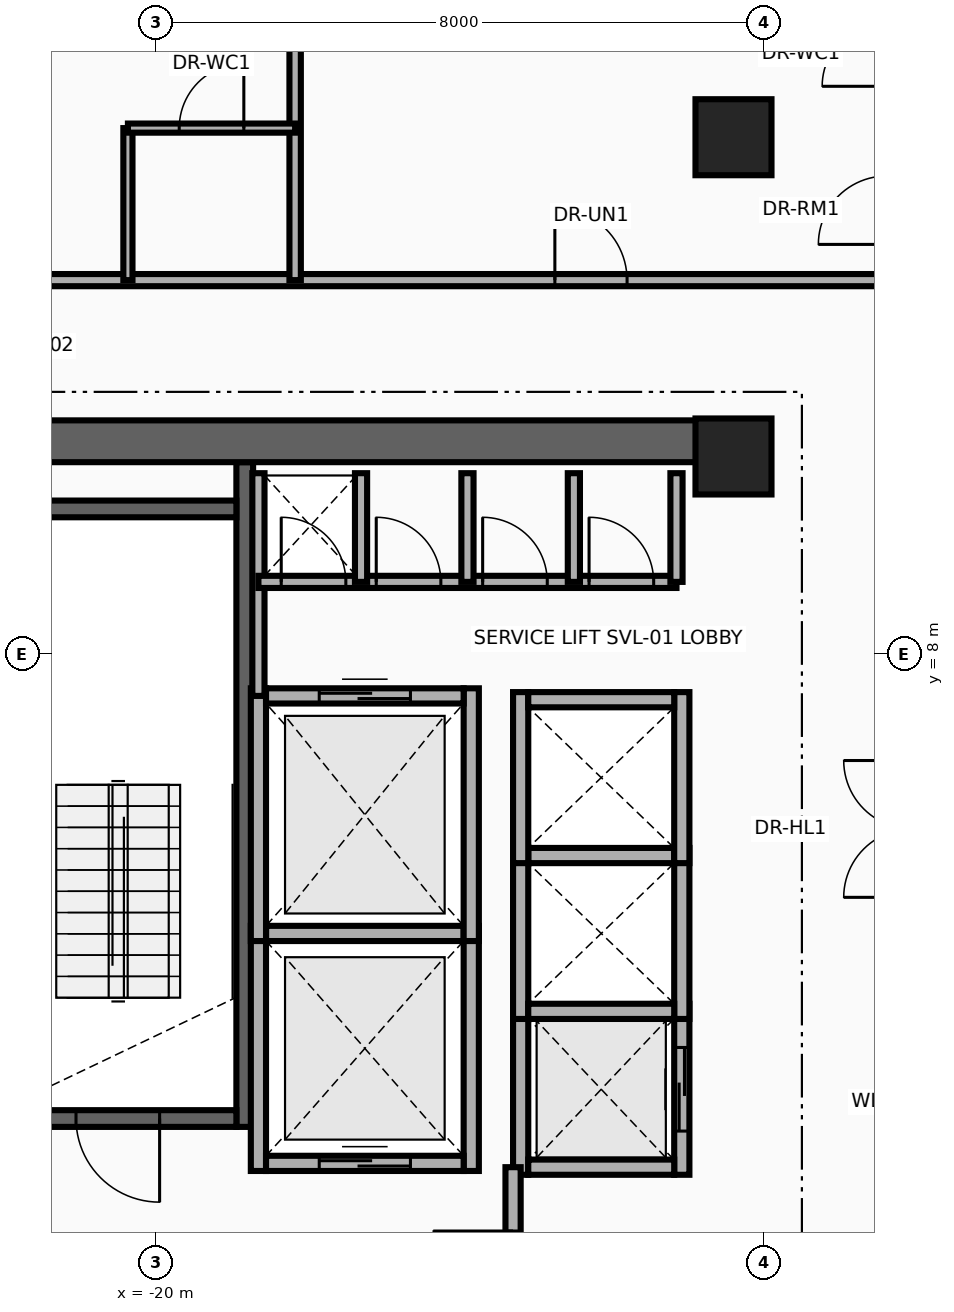
"""IFC4 building model, lengths in metres.
Left out: names, types, materials, properties, quantities, classifications, styles, units other than length and angle.
Written with IfcOpenShell. Run it as: python <this file> out.ifc"""

import sys

from ifc_helpers import new_model, si_unit, direction, frame, frame_2d, origin, origin_2d, place, context, subcontext, project, spatial, rectangle, extrude, source, transform, mapped, element, fill, save


model = new_model("IFC4")
c1 = context("Model", 3, precision=1e-05, world=origin(), true_north=direction((0.0, 1.0)))
c2 = subcontext(c1, "Body", "Model", "MODEL_VIEW")
j1 = project(units=[si_unit("LENGTHUNIT", "METRE"), si_unit("PLANEANGLEUNIT", "RADIAN")], contexts=[c1])
p1 = place(None, origin())
s1 = spatial("IfcSite", under=j1, at=p1, CompositionType="ELEMENT")
p2 = place(p1, origin())
s2 = spatial("IfcBuilding", under=s1, at=p2, CompositionType="ELEMENT")
p3 = place(p2, frame((0.0, 0.0, 184.45)))
s3 = spatial("IfcBuildingStorey", under=s2, at=p3, CompositionType="ELEMENT", Elevation=184.45)
p4 = place(p3, frame((-18.83, 1.78, 0.0), z_axis=(0.0, 0.0, 1.0), x_axis=(0.0, 1.0, 0.0)))
e1 = element("IfcWall", 1, at=p4, inside=s3, PredefinedType="SHEAR", context=c2, shape_type="SweptSolid", body=[
    extrude(rectangle(XDim=8.745, YDim=0.22, at=frame_2d((4.373, 0.0))), origin(), (0.0, 0.0, 1.0), 3.63),
])
p5 = place(p3, frame((-22.05, 1.89, 0.0), z_axis=(0.0, 0.0, 1.0), x_axis=(1.0, 0.0, 0.0)))
e2 = element("IfcWall", 2, at=p5, inside=s3, PredefinedType="SHEAR", context=c2, shape_type="SweptSolid", body=[
    extrude(rectangle(XDim=3.11, YDim=0.22, at=frame_2d((1.555, 0.0))), origin(), (0.0, 0.0, 1.0), 3.63),
])
p6 = place(p5, frame((1.0, 0.0, 0.0)))
e3 = element("IfcOpeningElement", 3, at=p6, cuts=e2, PredefinedType="OPENING", context=c2, shape_type="SweptSolid", body=[
    extrude(rectangle(XDim=1.1, YDim=2.15, at=frame_2d((0.55, 1.075))), frame((0.0, 0.125, 0.0), z_axis=(0.0, -1.0, 0.0), x_axis=(1.0, 0.0, 0.0)), (0.0, 0.0, 1.0), 0.25),
])
p7 = place(p3, frame((-22.05, 9.91, 0.0), z_axis=(0.0, 0.0, 1.0), x_axis=(1.0, 0.0, 0.0)))
e4 = element("IfcWall", 4, at=p7, inside=s3, PredefinedType="SHEAR", context=c2, shape_type="SweptSolid", body=[
    extrude(rectangle(XDim=3.11, YDim=0.22, at=frame_2d((1.555, 0.0))), origin(), (0.0, 0.0, 1.0), 3.63),
])
p8 = place(p3, frame((-22.65, 10.8, 0.0), z_axis=(0.0, 0.0, 1.0), x_axis=(1.0, 0.0, 0.0)))
e5 = element("IfcWall", 5, at=p8, inside=s3, PredefinedType="SHEAR", context=c2, shape_type="SweptSolid", body=[
    extrude(rectangle(XDim=10.25, YDim=0.55, at=frame_2d((5.125, 0.0))), origin(), (0.0, 0.0, 1.0), 3.63),
])
m1 = source(origin(), c2, "Body", "SweptSolid", [
    extrude(rectangle(XDim=1.0, YDim=1.0, at=origin_2d()), origin(), (0.0, 0.0, 1.0), 3.95),
])
for number, where, z_axis, x_axis in (
    (6, (-12.4, 10.6, 0.0), (0.0, 0.0, 1.0), (1.0, 0.0, 0.0)),
    (7, (-12.4, 14.8, 0.0), (0.0, 0.0, 1.0), (1.0, 0.0, 0.0)),
):
    element("IfcColumn", number, at=place(p3, frame(where, z_axis=z_axis, x_axis=x_axis)), inside=s3, PredefinedType="COLUMN", context=c2, shape_type="MappedRepresentation", body=[
        mapped(m1, transform((0.0, 0.0, 0.0), x_axis=(1.0, 0.0, 0.0), y_axis=(0.0, 1.0, 0.0), z_axis=(0.0, 0.0, 1.0), scale=1.0)),
    ])
for number, where, z_axis, x_axis in (
    (8, (-18.65, 1.2, 0.0), (0.0, 0.0, 1.0), (0.0, 1.0, 0.0)),
    (9, (-15.85, 1.2, 0.0), (0.0, 0.0, 1.0), (0.0, 1.0, 0.0)),
):
    element("IfcWall", number, at=place(p3, frame(where, z_axis=z_axis, x_axis=x_axis)), inside=s3, PredefinedType="MOVABLE", context=c2, shape_type="SweptSolid", body=[
        extrude(rectangle(XDim=3.225, YDim=0.2, at=frame_2d((1.613, 0.0))), origin(), (0.0, 0.0, 1.0), 3.63),
    ])
p9 = place(p3, frame((-18.55, 1.3, 0.0), z_axis=(0.0, 0.0, 1.0), x_axis=(1.0, 0.0, 0.0)))
e10 = element("IfcWall", 10, at=p9, inside=s3, PredefinedType="MOVABLE", context=c2, shape_type="SweptSolid", body=[
    extrude(rectangle(XDim=2.6, YDim=0.2, at=frame_2d((1.3, 0.0))), origin(), (0.0, 0.0, 1.0), 3.63),
])
p10 = place(p9, frame((0.7, 0.0, 0.0)))
e11 = element("IfcOpeningElement", 11, at=p10, cuts=e10, PredefinedType="OPENING", context=c2, shape_type="SweptSolid", body=[
    extrude(rectangle(XDim=1.2, YDim=2.1, at=frame_2d((0.6, 1.05))), frame((0.0, 0.115, 0.0), z_axis=(0.0, -1.0, 0.0), x_axis=(1.0, 0.0, 0.0)), (0.0, 0.0, 1.0), 0.23),
])
p11 = place(p3, frame((-18.55, 4.325, 0.0), z_axis=(0.0, 0.0, 1.0), x_axis=(1.0, 0.0, 0.0)))
e12 = element("IfcWall", 12, at=p11, inside=s3, PredefinedType="MOVABLE", context=c2, shape_type="SweptSolid", body=[
    extrude(rectangle(XDim=2.6, YDim=0.2, at=frame_2d((1.3, 0.0))), origin(), (0.0, 0.0, 1.0), 3.63),
])
for number, where, z_axis, x_axis in (
    (13, (-18.65, 4.225, 0.0), (0.0, 0.0, 1.0), (0.0, 1.0, 0.0)),
    (14, (-15.85, 4.225, 0.0), (0.0, 0.0, 1.0), (0.0, 1.0, 0.0)),
):
    element("IfcWall", number, at=place(p3, frame(where, z_axis=z_axis, x_axis=x_axis)), inside=s3, PredefinedType="MOVABLE", context=c2, shape_type="SweptSolid", body=[
        extrude(rectangle(XDim=3.325, YDim=0.2, at=frame_2d((1.663, 0.0))), origin(), (0.0, 0.0, 1.0), 3.63),
    ])
p12 = place(p3, frame((-18.55, 7.45, 0.0), z_axis=(0.0, 0.0, 1.0), x_axis=(1.0, 0.0, 0.0)))
e15 = element("IfcWall", 15, at=p12, inside=s3, PredefinedType="MOVABLE", context=c2, shape_type="SweptSolid", body=[
    extrude(rectangle(XDim=2.6, YDim=0.2, at=frame_2d((1.3, 0.0))), origin(), (0.0, 0.0, 1.0), 3.63),
])
p13 = place(p12, frame((0.7, 0.0, 0.0)))
e16 = element("IfcOpeningElement", 16, at=p13, cuts=e15, PredefinedType="OPENING", context=c2, shape_type="SweptSolid", body=[
    extrude(rectangle(XDim=1.2, YDim=2.1, at=frame_2d((0.6, 1.05))), frame((0.0, 0.115, 0.0), z_axis=(0.0, -1.0, 0.0), x_axis=(1.0, 0.0, 0.0)), (0.0, 0.0, 1.0), 0.23),
])
p14 = place(p3, frame((-15.2, 1.15, 0.0), z_axis=(0.0, 0.0, 1.0), x_axis=(0.0, 1.0, 0.0)))
e17 = element("IfcWall", 17, at=p14, inside=s3, PredefinedType="MOVABLE", context=c2, shape_type="SweptSolid", body=[
    extrude(rectangle(XDim=2.25, YDim=0.2, at=frame_2d((1.125, 0.0))), origin(), (0.0, 0.0, 1.0), 3.63),
])
p15 = place(p3, frame((-13.08, 1.15, 0.0), z_axis=(0.0, 0.0, 1.0), x_axis=(0.0, 1.0, 0.0)))
e18 = element("IfcWall", 18, at=p15, inside=s3, PredefinedType="MOVABLE", context=c2, shape_type="SweptSolid", body=[
    extrude(rectangle(XDim=2.25, YDim=0.2, at=frame_2d((1.125, 0.0))), origin(), (0.0, 0.0, 1.0), 3.63),
])
p16 = place(p15, frame((0.575, 0.0, 0.0)))
e19 = element("IfcOpeningElement", 19, at=p16, cuts=e18, PredefinedType="OPENING", context=c2, shape_type="SweptSolid", body=[
    extrude(rectangle(XDim=1.1, YDim=2.1, at=frame_2d((0.55, 1.05))), frame((0.0, 0.115, 0.0), z_axis=(0.0, -1.0, 0.0), x_axis=(1.0, 0.0, 0.0)), (0.0, 0.0, 1.0), 0.23),
])
p17 = place(p3, frame((-15.1, 1.25, 0.0), z_axis=(0.0, 0.0, 1.0), x_axis=(1.0, 0.0, 0.0)))
e20 = element("IfcWall", 20, at=p17, inside=s3, PredefinedType="MOVABLE", context=c2, shape_type="SweptSolid", body=[
    extrude(rectangle(XDim=1.92, YDim=0.2, at=frame_2d((0.96, 0.0))), origin(), (0.0, 0.0, 1.0), 3.63),
])
for number, where, z_axis, x_axis in (
    (21, (-15.2, 3.2, 0.0), (0.0, 0.0, 1.0), (0.0, 1.0, 0.0)),
    (22, (-13.08, 3.2, 0.0), (0.0, 0.0, 1.0), (0.0, 1.0, 0.0)),
):
    element("IfcWall", number, at=place(p3, frame(where, z_axis=z_axis, x_axis=x_axis)), inside=s3, PredefinedType="MOVABLE", context=c2, shape_type="SweptSolid", body=[
        extrude(rectangle(XDim=2.25, YDim=0.2, at=frame_2d((1.125, 0.0))), origin(), (0.0, 0.0, 1.0), 3.63),
    ])
for number, where, z_axis, x_axis in (
    (23, (-15.1, 3.3, 0.0), (0.0, 0.0, 1.0), (1.0, 0.0, 0.0)),
    (24, (-15.1, 5.35, 0.0), (0.0, 0.0, 1.0), (1.0, 0.0, 0.0)),
):
    element("IfcWall", number, at=place(p3, frame(where, z_axis=z_axis, x_axis=x_axis)), inside=s3, PredefinedType="MOVABLE", context=c2, shape_type="SweptSolid", body=[
        extrude(rectangle(XDim=1.92, YDim=0.2, at=frame_2d((0.96, 0.0))), origin(), (0.0, 0.0, 1.0), 3.63),
    ])
for number, where, z_axis, x_axis in (
    (25, (-15.2, 5.25, 0.0), (0.0, 0.0, 1.0), (0.0, 1.0, 0.0)),
    (26, (-13.08, 5.25, 0.0), (0.0, 0.0, 1.0), (0.0, 1.0, 0.0)),
):
    element("IfcWall", number, at=place(p3, frame(where, z_axis=z_axis, x_axis=x_axis)), inside=s3, PredefinedType="MOVABLE", context=c2, shape_type="SweptSolid", body=[
        extrude(rectangle(XDim=2.25, YDim=0.2, at=frame_2d((1.125, 0.0))), origin(), (0.0, 0.0, 1.0), 3.63),
    ])
p18 = place(p3, frame((-15.1, 7.4, 0.0), z_axis=(0.0, 0.0, 1.0), x_axis=(1.0, 0.0, 0.0)))
e27 = element("IfcWall", 27, at=p18, inside=s3, PredefinedType="MOVABLE", context=c2, shape_type="SweptSolid", body=[
    extrude(rectangle(XDim=1.92, YDim=0.2, at=frame_2d((0.96, 0.0))), origin(), (0.0, 0.0, 1.0), 3.63),
])
p19 = place(p3, frame((-15.3, -1.42, 0.0), z_axis=(0.0, 0.0, 1.0), x_axis=(0.0, 1.0, 0.0)))
e28 = element("IfcWall", 28, at=p19, inside=s3, PredefinedType="PARTITIONING", context=c2, shape_type="SweptSolid", body=[
    extrude(rectangle(XDim=2.67, YDim=0.2, at=frame_2d((1.335, 0.0))), origin(), (0.0, 0.0, 1.0), 3.63),
])
p20 = place(p19, frame((0.78, 0.0, 0.0)))
e29 = element("IfcOpeningElement", 29, at=p20, cuts=e28, PredefinedType="OPENING", context=c2, shape_type="SweptSolid", body=[
    extrude(rectangle(XDim=1.05, YDim=2.15, at=frame_2d((0.525, 1.075))), frame((0.0, 0.115, 0.0), z_axis=(0.0, -1.0, 0.0), x_axis=(1.0, 0.0, 0.0)), (0.0, 0.0, 1.0), 0.23),
])
p21 = place(p3, frame((-18.65, 7.45, 0.0), z_axis=(0.0, 0.0, 1.0), x_axis=(0.0, 1.0, 0.0)))
e30 = element("IfcWall", 30, at=p21, inside=s3, PredefinedType="PARTITIONING", context=c2, shape_type="SweptSolid", body=[
    extrude(rectangle(XDim=2.93, YDim=0.16, at=frame_2d((1.465, 0.0))), origin(), (0.0, 0.0, 1.0), 3.63),
])
p22 = place(p3, frame((-18.65, 8.95, 0.0), z_axis=(0.0, 0.0, 1.0), x_axis=(1.0, 0.0, 0.0)))
e31 = element("IfcWall", 31, at=p22, inside=s3, PredefinedType="PARTITIONING", context=c2, shape_type="SweptSolid", body=[
    extrude(rectangle(XDim=5.5, YDim=0.16, at=frame_2d((2.75, 0.0))), origin(), (0.0, 0.0, 1.0), 3.63),
])
p23 = place(p22, frame((0.3, 0.0, 0.0)))
e32 = element("IfcOpeningElement", 32, at=p23, cuts=e31, PredefinedType="OPENING", context=c2, shape_type="SweptSolid", body=[
    extrude(rectangle(XDim=0.85, YDim=2.05, at=frame_2d((0.425, 1.025))), frame((0.0, 0.095, 0.0), z_axis=(0.0, -1.0, 0.0), x_axis=(1.0, 0.0, 0.0)), (0.0, 0.0, 1.0), 0.19),
])
p24 = place(p22, frame((1.55, 0.0, 0.0)))
e33 = element("IfcOpeningElement", 33, at=p24, cuts=e31, PredefinedType="OPENING", context=c2, shape_type="SweptSolid", body=[
    extrude(rectangle(XDim=0.85, YDim=2.05, at=frame_2d((0.425, 1.025))), frame((0.0, 0.095, 0.0), z_axis=(0.0, -1.0, 0.0), x_axis=(1.0, 0.0, 0.0)), (0.0, 0.0, 1.0), 0.19),
])
p25 = place(p22, frame((2.95, 0.0, 0.0)))
e34 = element("IfcOpeningElement", 34, at=p25, cuts=e31, PredefinedType="OPENING", context=c2, shape_type="SweptSolid", body=[
    extrude(rectangle(XDim=0.85, YDim=2.05, at=frame_2d((0.425, 1.025))), frame((0.0, 0.095, 0.0), z_axis=(0.0, -1.0, 0.0), x_axis=(1.0, 0.0, 0.0)), (0.0, 0.0, 1.0), 0.19),
])
p26 = place(p22, frame((4.35, 0.0, 0.0)))
e35 = element("IfcOpeningElement", 35, at=p26, cuts=e31, PredefinedType="OPENING", context=c2, shape_type="SweptSolid", body=[
    extrude(rectangle(XDim=0.85, YDim=2.05, at=frame_2d((0.425, 1.025))), frame((0.0, 0.095, 0.0), z_axis=(0.0, -1.0, 0.0), x_axis=(1.0, 0.0, 0.0)), (0.0, 0.0, 1.0), 0.19),
])
for number, where, z_axis, x_axis in (
    (36, (-13.15, 8.95, 0.0), (0.0, 0.0, 1.0), (0.0, 1.0, 0.0)),
    (37, (-17.3, 8.95, 0.0), (0.0, 0.0, 1.0), (0.0, 1.0, 0.0)),
    (38, (-15.9, 8.95, 0.0), (0.0, 0.0, 1.0), (0.0, 1.0, 0.0)),
    (39, (-14.5, 8.95, 0.0), (0.0, 0.0, 1.0), (0.0, 1.0, 0.0)),
):
    element("IfcWall", number, at=place(p3, frame(where, z_axis=z_axis, x_axis=x_axis)), inside=s3, PredefinedType="PARTITIONING", context=c2, shape_type="SweptSolid", body=[
        extrude(rectangle(XDim=1.43, YDim=0.16, at=frame_2d((0.715, 0.0))), origin(), (0.0, 0.0, 1.0), 3.63),
    ])
p27 = place(p3, frame((-28.25, 12.92, 0.0), z_axis=(0.0, 0.0, 1.0), x_axis=(1.0, 0.0, 0.0)))
e40 = element("IfcWall", 40, at=p27, inside=s3, PredefinedType="PARTITIONING", context=c2, shape_type="SweptSolid", body=[
    extrude(rectangle(XDim=36.75, YDim=0.16, at=frame_2d((18.375, 0.0))), origin(), (0.0, 0.0, 1.0), 2.615),
])
p28 = place(p27, frame((0.973, 0.0, 0.0)))
e41 = element("IfcOpeningElement", 41, at=p28, cuts=e40, PredefinedType="OPENING", context=c2, shape_type="SweptSolid", body=[
    extrude(rectangle(XDim=0.95, YDim=2.15, at=frame_2d((0.475, 1.075))), frame((0.0, 0.095, 0.0), z_axis=(0.0, -1.0, 0.0), x_axis=(1.0, 0.0, 0.0)), (0.0, 0.0, 1.0), 0.19),
])
p29 = place(p27, frame((4.915, 0.0, 0.0)))
e42 = element("IfcOpeningElement", 42, at=p29, cuts=e40, PredefinedType="OPENING", context=c2, shape_type="SweptSolid", body=[
    extrude(rectangle(XDim=0.95, YDim=2.15, at=frame_2d((0.475, 1.075))), frame((0.0, 0.095, 0.0), z_axis=(0.0, -1.0, 0.0), x_axis=(1.0, 0.0, 0.0)), (0.0, 0.0, 1.0), 0.19),
])
p30 = place(p27, frame((13.5, 0.0, 0.0)))
e43 = element("IfcOpeningElement", 43, at=p30, cuts=e40, PredefinedType="OPENING", context=c2, shape_type="SweptSolid", body=[
    extrude(rectangle(XDim=0.95, YDim=2.15, at=frame_2d((0.475, 1.075))), frame((0.0, 0.095, 0.0), z_axis=(0.0, -1.0, 0.0), x_axis=(1.0, 0.0, 0.0)), (0.0, 0.0, 1.0), 0.19),
])
p31 = place(p27, frame((26.834, 0.0, 0.0)))
e44 = element("IfcOpeningElement", 44, at=p31, cuts=e40, PredefinedType="OPENING", context=c2, shape_type="SweptSolid", body=[
    extrude(rectangle(XDim=0.95, YDim=2.15, at=frame_2d((0.475, 1.075))), frame((0.0, 0.095, 0.0), z_axis=(0.0, -1.0, 0.0), x_axis=(1.0, 0.0, 0.0)), (0.0, 0.0, 1.0), 0.19),
])
p32 = place(p3, frame((-18.167, 12.92, 0.0), z_axis=(0.0, 0.0, 1.0), x_axis=(0.0, 1.0, 0.0)))
e45 = element("IfcWall", 45, at=p32, inside=s3, PredefinedType="PARTITIONING", context=c2, shape_type="SweptSolid", body=[
    extrude(rectangle(XDim=6.188, YDim=0.15, at=frame_2d((3.094, 0.0))), origin(), (0.0, 0.0, 1.0), 2.665),
])
p33 = place(p3, frame((-20.367, 12.92, 0.0), z_axis=(0.0, 0.0, 1.0), x_axis=(0.0, 1.0, 0.0)))
e46 = element("IfcWall", 46, at=p33, inside=s3, PredefinedType="PARTITIONING", context=c2, shape_type="SweptSolid", body=[
    extrude(rectangle(XDim=2.0, YDim=0.12, at=frame_2d((1.0, 0.0))), origin(), (0.0, 0.0, 1.0), 2.665),
])
p34 = place(p3, frame((-20.367, 14.92, 0.0), z_axis=(0.0, 0.0, 1.0), x_axis=(1.0, 0.0, 0.0)))
e47 = element("IfcWall", 47, at=p34, inside=s3, PredefinedType="PARTITIONING", context=c2, shape_type="SweptSolid", body=[
    extrude(rectangle(XDim=2.2, YDim=0.12, at=frame_2d((1.1, 0.0))), origin(), (0.0, 0.0, 1.0), 2.665),
])
p35 = place(p34, frame((0.675, 0.0, 0.0)))
e48 = element("IfcOpeningElement", 48, at=p35, cuts=e47, PredefinedType="OPENING", context=c2, shape_type="SweptSolid", body=[
    extrude(rectangle(XDim=0.85, YDim=2.1, at=frame_2d((0.425, 1.05))), frame((0.0, 0.075, 0.0), z_axis=(0.0, -1.0, 0.0), x_axis=(1.0, 0.0, 0.0)), (0.0, 0.0, 1.0), 0.15),
])
p36 = place(p10, origin())
e49 = element("IfcDoor", 49, at=p36, inside=s3, OperationType="DOUBLE_DOOR_SLIDING", PredefinedType="DOOR", context=c2, shape_type="SweptSolid", body=[
    extrude(rectangle(XDim=1.2, YDim=2.1, at=frame_2d((0.6, 1.05))), frame((0.0, 0.025, 0.0), z_axis=(0.0, -1.0, 0.0), x_axis=(1.0, 0.0, 0.0)), (0.0, 0.0, 1.0), 0.05),
])
fill(e11, e49)
p37 = place(p13, origin())
e50 = element("IfcDoor", 50, at=p37, inside=s3, OperationType="DOUBLE_DOOR_SLIDING", PredefinedType="DOOR", context=c2, shape_type="SweptSolid", body=[
    extrude(rectangle(XDim=1.2, YDim=2.1, at=frame_2d((0.6, 1.05))), frame((0.0, 0.025, 0.0), z_axis=(0.0, -1.0, 0.0), x_axis=(1.0, 0.0, 0.0)), (0.0, 0.0, 1.0), 0.05),
])
fill(e16, e50)
p38 = place(p16, origin())
e51 = element("IfcDoor", 51, at=p38, inside=s3, OperationType="DOUBLE_DOOR_SLIDING", PredefinedType="DOOR", context=c2, shape_type="SweptSolid", body=[
    extrude(rectangle(XDim=1.1, YDim=2.1, at=frame_2d((0.55, 1.05))), frame((0.0, 0.025, 0.0), z_axis=(0.0, -1.0, 0.0), x_axis=(1.0, 0.0, 0.0)), (0.0, 0.0, 1.0), 0.05),
])
fill(e19, e51)
p39 = place(p20, origin())
e52 = element("IfcDoor", 52, at=p39, inside=s3, OperationType="SINGLE_SWING_RIGHT", PredefinedType="DOOR", context=c2, shape_type="SweptSolid", body=[
    extrude(rectangle(XDim=1.05, YDim=2.15, at=frame_2d((0.525, 1.075))), frame((0.0, 0.025, 0.0), z_axis=(0.0, -1.0, 0.0), x_axis=(1.0, 0.0, 0.0)), (0.0, 0.0, 1.0), 0.05),
])
fill(e29, e52)
p40 = place(p6, frame((1.1, 0.0, 0.0), z_axis=(0.0, 0.0, 1.0), x_axis=(-1.0, 0.0, 0.0)))
e53 = element("IfcDoor", 53, at=p40, inside=s3, OperationType="SINGLE_SWING_LEFT", PredefinedType="DOOR", context=c2, shape_type="SweptSolid", body=[
    extrude(rectangle(XDim=1.1, YDim=2.15, at=frame_2d((0.55, 1.075))), frame((0.0, 0.025, 0.0), z_axis=(0.0, -1.0, 0.0), x_axis=(1.0, 0.0, 0.0)), (0.0, 0.0, 1.0), 0.05),
])
fill(e3, e53)
p41 = place(p23, origin())
e54 = element("IfcDoor", 54, at=p41, inside=s3, OperationType="SINGLE_SWING_LEFT", PredefinedType="DOOR", context=c2, shape_type="SweptSolid", body=[
    extrude(rectangle(XDim=0.85, YDim=2.05, at=frame_2d((0.425, 1.025))), frame((0.0, 0.025, 0.0), z_axis=(0.0, -1.0, 0.0), x_axis=(1.0, 0.0, 0.0)), (0.0, 0.0, 1.0), 0.05),
])
fill(e32, e54)
p42 = place(p24, origin())
e55 = element("IfcDoor", 55, at=p42, inside=s3, OperationType="SINGLE_SWING_RIGHT", PredefinedType="DOOR", context=c2, shape_type="SweptSolid", body=[
    extrude(rectangle(XDim=0.85, YDim=2.05, at=frame_2d((0.425, 1.025))), frame((0.0, 0.025, 0.0), z_axis=(0.0, -1.0, 0.0), x_axis=(1.0, 0.0, 0.0)), (0.0, 0.0, 1.0), 0.05),
])
fill(e33, e55)
p43 = place(p25, origin())
e56 = element("IfcDoor", 56, at=p43, inside=s3, OperationType="SINGLE_SWING_LEFT", PredefinedType="DOOR", context=c2, shape_type="SweptSolid", body=[
    extrude(rectangle(XDim=0.85, YDim=2.05, at=frame_2d((0.425, 1.025))), frame((0.0, 0.025, 0.0), z_axis=(0.0, -1.0, 0.0), x_axis=(1.0, 0.0, 0.0)), (0.0, 0.0, 1.0), 0.05),
])
fill(e34, e56)
p44 = place(p26, origin())
e57 = element("IfcDoor", 57, at=p44, inside=s3, OperationType="SINGLE_SWING_RIGHT", PredefinedType="DOOR", context=c2, shape_type="SweptSolid", body=[
    extrude(rectangle(XDim=0.85, YDim=2.05, at=frame_2d((0.425, 1.025))), frame((0.0, 0.025, 0.0), z_axis=(0.0, -1.0, 0.0), x_axis=(1.0, 0.0, 0.0)), (0.0, 0.0, 1.0), 0.05),
])
fill(e35, e57)
p45 = place(p35, origin())
e58 = element("IfcDoor", 58, at=p45, inside=s3, OperationType="SINGLE_SWING_LEFT", PredefinedType="DOOR", context=c2, shape_type="SweptSolid", body=[
    extrude(rectangle(XDim=0.85, YDim=2.1, at=frame_2d((0.425, 1.05))), frame((0.0, 0.025, 0.0), z_axis=(0.0, -1.0, 0.0), x_axis=(1.0, 0.0, 0.0)), (0.0, 0.0, 1.0), 0.05),
])
fill(e48, e58)
p46 = place(p30, origin())
e59 = element("IfcDoor", 59, at=p46, inside=s3, OperationType="SINGLE_SWING_RIGHT", PredefinedType="DOOR", context=c2, shape_type="SweptSolid", body=[
    extrude(rectangle(XDim=0.95, YDim=2.15, at=frame_2d((0.475, 1.075))), frame((0.0, 0.025, 0.0), z_axis=(0.0, -1.0, 0.0), x_axis=(1.0, 0.0, 0.0)), (0.0, 0.0, 1.0), 0.05),
])
fill(e43, e59)
save(model, sys.argv[1])
